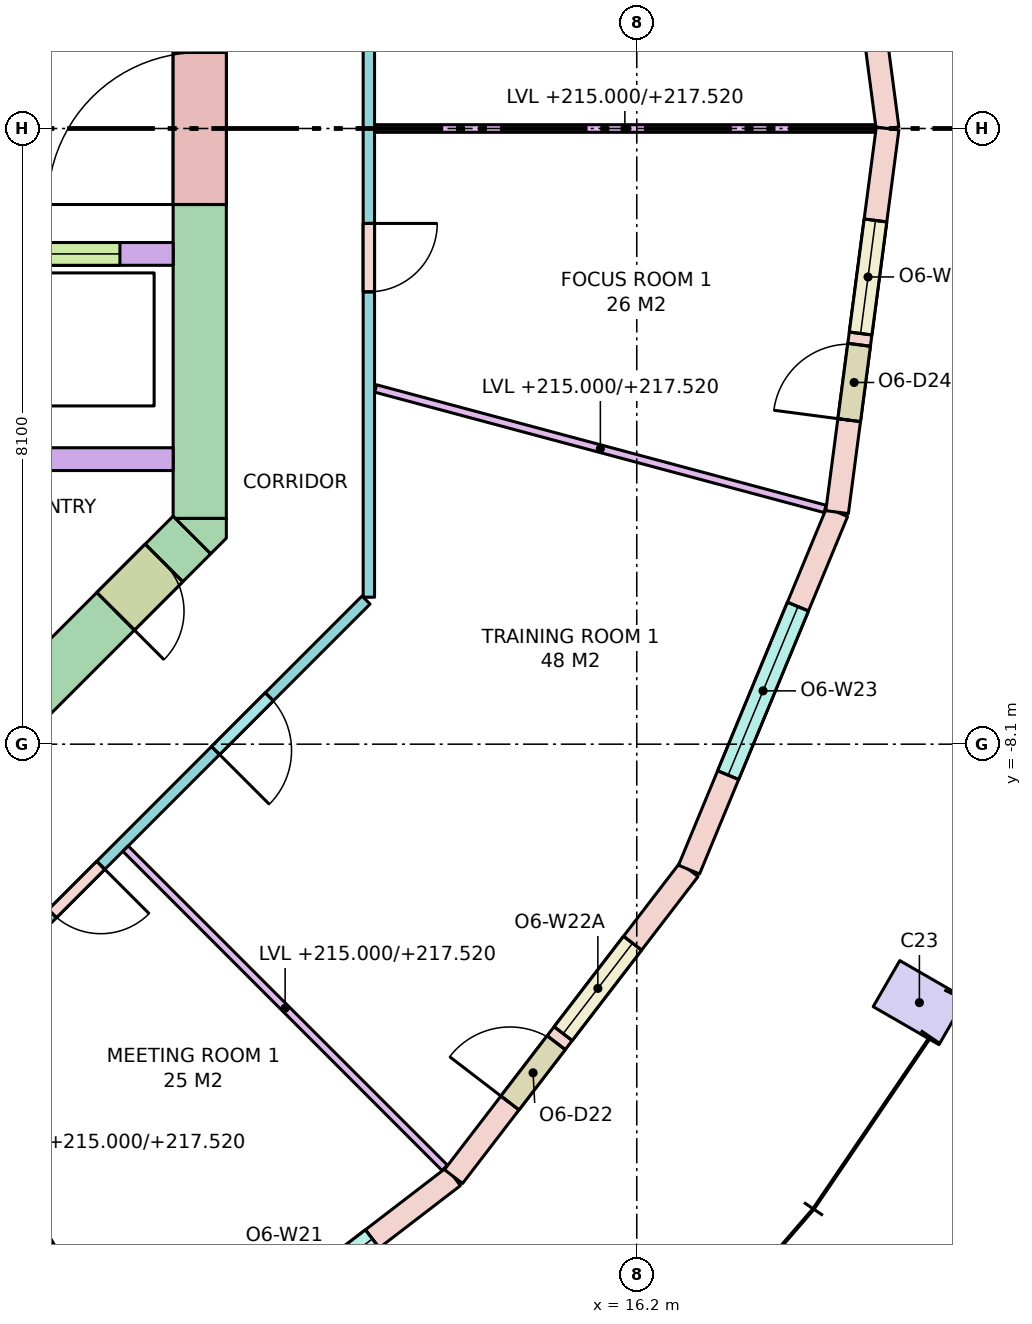
"""IFC4 building model, lengths in metres.
Left out: names, types, materials, properties, quantities, classifications, styles, units other than length and angle.
Written with IfcOpenShell. Run it as: python <this file> out.ifc"""

import sys

from ifc_helpers import new_model, si_unit, direction, frame, frame_2d, origin, origin_2d, place, context, subcontext, project, spatial, polyline, rectangle, outline, extrude, element, fill, save


model = new_model("IFC4")
c1 = context("Model", 3, precision=1e-05, world=origin(), true_north=direction((0.0, 1.0)))
c2 = subcontext(c1, "Body", "Model", "MODEL_VIEW")
j1 = project(units=[si_unit("LENGTHUNIT", "METRE"), si_unit("PLANEANGLEUNIT", "RADIAN")], contexts=[c1])
p1 = place(None, origin())
s1 = spatial("IfcSite", under=j1, at=p1, CompositionType="ELEMENT")
p2 = place(p1, origin())
s2 = spatial("IfcBuilding", under=s1, at=p2, CompositionType="ELEMENT")
p3 = place(p2, frame((0.0, 0.0, 215.0)))
s3 = spatial("IfcBuildingStorey", under=s2, at=p3, CompositionType="ELEMENT", Elevation=215.0)
p4 = place(p3, frame((19.919, -11.5, 0.0), z_axis=(0.0, 0.0, 1.0), x_axis=(0.5, 0.866025403784, 0.0)))
e1 = element("IfcColumn", 1, at=p4, inside=s3, PredefinedType="COLUMN", context=c2, shape_type="SweptSolid", body=[
    extrude(rectangle(XDim=0.7, YDim=1.0, at=origin_2d()), origin(), (0.0, 0.0, 1.0), 3.7),
])
p5 = place(p3, frame((10.45, -5.13, -0.28), z_axis=(0.0, 0.0, 1.0), x_axis=(0.0, 1.0, 0.0)))
e2 = element("IfcWall", 2, at=p5, inside=s3, PredefinedType="SHEAR", context=c2, shape_type="SweptSolid", body=[
    extrude(rectangle(XDim=10.26, YDim=0.7, at=frame_2d((5.13, 0.0))), origin(), (0.0, 0.0, 1.0), 3.7),
])
p6 = place(p5, frame((4.13, 0.0, 0.28)))
e3 = element("IfcOpeningElement", 3, at=p6, cuts=e2, PredefinedType="OPENING", context=c2, shape_type="SweptSolid", body=[
    extrude(rectangle(XDim=2.0, YDim=2.1, at=frame_2d((1.0, 1.05))), frame((0.0, 0.36, 0.0), z_axis=(0.0, -1.0, 0.0), x_axis=(1.0, 0.0, 0.0)), (0.0, 0.0, 1.0), 0.72),
])
p7 = place(p3, frame((10.347, -5.347, -0.28), z_axis=(0.0, 0.0, 1.0), x_axis=(-0.707106781187, -0.707106781187, 0.0)))
e4 = element("IfcWall", 4, at=p7, inside=s3, PredefinedType="SHEAR", context=c2, shape_type="SweptSolid", body=[
    extrude(rectangle(XDim=4.243, YDim=0.7, at=frame_2d((2.121, 0.0))), origin(), (0.0, 0.0, 1.0), 3.7),
])
p8 = place(p7, frame((0.52, 0.0, 0.28)))
e5 = element("IfcOpeningElement", 5, at=p8, cuts=e4, PredefinedType="OPENING", context=c2, shape_type="SweptSolid", body=[
    extrude(rectangle(XDim=0.9, YDim=2.1, at=frame_2d((0.45, 1.05))), frame((0.0, 0.36, 0.0), z_axis=(0.0, -1.0, 0.0), x_axis=(1.0, 0.0, 0.0)), (0.0, 0.0, 1.0), 0.72),
])
p9 = place(p3, frame((0.0, 0.0, -0.28)))
e6 = element("IfcWall", 6, at=p9, inside=s3, PredefinedType="SHEAR", context=c2, shape_type="SweptSolid", body=[
    extrude(outline(polyline([(10.8, -5.39), (10.595, -5.595), (10.595, -5.595), (10.595, -5.595), (10.13, -5.13), (10.8, -5.13), (10.8, -5.13), (10.8, -5.39)])), origin(), (0.0, 0.0, 1.0), 3.7),
])
p10 = place(p3, frame((2.0, -4.35, 0.0), z_axis=(0.0, 0.0, 1.0), x_axis=(1.0, 0.0, 0.0)))
e7 = element("IfcWall", 7, at=p10, inside=s3, PredefinedType="SOLIDWALL", context=c2, shape_type="SweptSolid", body=[
    extrude(rectangle(XDim=8.1, YDim=0.3, at=frame_2d((4.05, 0.0))), origin(), (0.0, 0.0, 1.0), 3.42),
])
p11 = place(p3, frame((2.0, -1.65, 0.0), z_axis=(0.0, 0.0, 1.0), x_axis=(1.0, 0.0, 0.0)))
e8 = element("IfcWall", 8, at=p11, inside=s3, PredefinedType="SOLIDWALL", context=c2, shape_type="SweptSolid", body=[
    extrude(rectangle(XDim=8.1, YDim=0.3, at=frame_2d((4.05, 0.0))), origin(), (0.0, 0.0, 1.0), 3.42),
])
p12 = place(p11, frame((0.85, 0.0, 0.0)))
e9 = element("IfcOpeningElement", 9, at=p12, cuts=e8, PredefinedType="OPENING", context=c2, shape_type="SweptSolid", body=[
    extrude(rectangle(XDim=1.1, YDim=2.1, at=frame_2d((0.55, 1.05))), frame((0.0, 0.16, 0.0), z_axis=(0.0, -1.0, 0.0), x_axis=(1.0, 0.0, 0.0)), (0.0, 0.0, 1.0), 0.32),
])
p13 = place(p11, frame((3.5, 0.0, 0.0)))
e10 = element("IfcOpeningElement", 10, at=p13, cuts=e8, PredefinedType="OPENING", context=c2, shape_type="SweptSolid", body=[
    extrude(rectangle(XDim=1.1, YDim=2.1, at=frame_2d((0.55, 1.05))), frame((0.0, 0.16, 0.0), z_axis=(0.0, -1.0, 0.0), x_axis=(1.0, 0.0, 0.0)), (0.0, 0.0, 1.0), 0.32),
])
p14 = place(p11, frame((6.3, 0.0, 0.0)))
e11 = element("IfcOpeningElement", 11, at=p14, cuts=e8, PredefinedType="OPENING", context=c2, shape_type="SweptSolid", body=[
    extrude(rectangle(XDim=1.1, YDim=2.1, at=frame_2d((0.55, 1.05))), frame((0.0, 0.16, 0.0), z_axis=(0.0, -1.0, 0.0), x_axis=(1.0, 0.0, 0.0)), (0.0, 0.0, 1.0), 0.32),
])
p15 = place(p3, frame((19.5, 0.0, 0.0), z_axis=(0.0, 0.0, 1.0), x_axis=(-0.130495451964, 0.99144890792, 0.0)))
e12 = element("IfcWall", 12, at=p15, inside=s3, PredefinedType="STANDARD", context=c2, shape_type="SweptSolid", body=[
    extrude(rectangle(XDim=5.091, YDim=0.3, at=frame_2d((2.545, 0.0))), origin(), (0.0, 0.0, 1.0), 3.42),
])
p16 = place(p15, frame((1.345, 0.0, 0.8)))
e13 = element("IfcOpeningElement", 13, at=p16, cuts=e12, PredefinedType="OPENING", context=c2, shape_type="SweptSolid", body=[
    extrude(rectangle(XDim=2.4, YDim=2.4, at=frame_2d((1.2, 1.2))), frame((0.0, 0.16, 0.0), z_axis=(0.0, -1.0, 0.0), x_axis=(1.0, 0.0, 0.0)), (0.0, 0.0, 1.0), 0.32),
])
p17 = place(p3, frame((9.75, -16.887, 0.0), z_axis=(0.0, 0.0, 1.0), x_axis=(0.79335619014, 0.608757714995, 0.0)))
e14 = element("IfcWall", 14, at=p17, inside=s3, PredefinedType="STANDARD", context=c2, shape_type="SweptSolid", body=[
    extrude(rectangle(XDim=5.091, YDim=0.3, at=frame_2d((2.545, 0.0))), origin(), (0.0, 0.0, 1.0), 3.42),
])
p18 = place(p17, frame((1.345, 0.0, 0.8)))
e15 = element("IfcOpeningElement", 15, at=p18, cuts=e14, PredefinedType="OPENING", context=c2, shape_type="SweptSolid", body=[
    extrude(rectangle(XDim=2.4, YDim=2.4, at=frame_2d((1.2, 1.2))), frame((0.0, 0.16, 0.0), z_axis=(0.0, -1.0, 0.0), x_axis=(1.0, 0.0, 0.0)), (0.0, 0.0, 1.0), 0.32),
])
p19 = place(p3, frame((13.789, -13.789, 0.0), z_axis=(0.0, 0.0, 1.0), x_axis=(0.608757714995, 0.79335619014, 0.0)))
e16 = element("IfcWall", 16, at=p19, inside=s3, PredefinedType="STANDARD", context=c2, shape_type="SweptSolid", body=[
    extrude(rectangle(XDim=5.091, YDim=0.3, at=frame_2d((2.545, 0.0))), origin(), (0.0, 0.0, 1.0), 3.42),
])
p20 = place(p19, frame((1.22, 0.0, 0.0)))
e17 = element("IfcOpeningElement", 17, at=p20, cuts=e16, PredefinedType="OPENING", context=c2, shape_type="SweptSolid", body=[
    extrude(rectangle(XDim=1.0, YDim=2.4, at=frame_2d((0.5, 1.2))), frame((0.0, 0.16, 0.0), z_axis=(0.0, -1.0, 0.0), x_axis=(1.0, 0.0, 0.0)), (0.0, 0.0, 1.0), 0.32),
])
p21 = place(p19, frame((2.37, 0.0, 0.8)))
e18 = element("IfcOpeningElement", 18, at=p21, cuts=e16, PredefinedType="OPENING", context=c2, shape_type="SweptSolid", body=[
    extrude(rectangle(XDim=1.5, YDim=2.4, at=frame_2d((0.75, 1.2))), frame((0.0, 0.16, 0.0), z_axis=(0.0, -1.0, 0.0), x_axis=(1.0, 0.0, 0.0)), (0.0, 0.0, 1.0), 0.32),
])
p22 = place(p3, frame((16.887, -9.75, 0.0), z_axis=(0.0, 0.0, 1.0), x_axis=(0.382724538613, 0.923862504675, 0.0)))
e19 = element("IfcWall", 19, at=p22, inside=s3, PredefinedType="STANDARD", context=c2, shape_type="SweptSolid", body=[
    extrude(rectangle(XDim=5.091, YDim=0.3, at=frame_2d((2.545, 0.0))), origin(), (0.0, 0.0, 1.0), 3.42),
])
p23 = place(p22, frame((1.345, 0.0, 0.8)))
e20 = element("IfcOpeningElement", 20, at=p23, cuts=e19, PredefinedType="OPENING", context=c2, shape_type="SweptSolid", body=[
    extrude(rectangle(XDim=2.4, YDim=2.4, at=frame_2d((1.2, 1.2))), frame((0.0, 0.16, 0.0), z_axis=(0.0, -1.0, 0.0), x_axis=(1.0, 0.0, 0.0)), (0.0, 0.0, 1.0), 0.32),
])
p24 = place(p3, frame((18.836, -5.047, 0.0), z_axis=(0.0, 0.0, 1.0), x_axis=(0.130495451964, 0.99144890792, 0.0)))
e21 = element("IfcWall", 21, at=p24, inside=s3, PredefinedType="STANDARD", context=c2, shape_type="SweptSolid", body=[
    extrude(rectangle(XDim=5.091, YDim=0.3, at=frame_2d((2.545, 0.0))), origin(), (0.0, 0.0, 1.0), 3.42),
])
p25 = place(p24, frame((1.22, 0.0, 0.0)))
e22 = element("IfcOpeningElement", 22, at=p25, cuts=e21, PredefinedType="OPENING", context=c2, shape_type="SweptSolid", body=[
    extrude(rectangle(XDim=1.0, YDim=2.4, at=frame_2d((0.5, 1.2))), frame((0.0, 0.16, 0.0), z_axis=(0.0, -1.0, 0.0), x_axis=(1.0, 0.0, 0.0)), (0.0, 0.0, 1.0), 0.32),
])
p26 = place(p24, frame((2.37, 0.0, 0.8)))
e23 = element("IfcOpeningElement", 23, at=p26, cuts=e21, PredefinedType="OPENING", context=c2, shape_type="SweptSolid", body=[
    extrude(rectangle(XDim=1.5, YDim=2.4, at=frame_2d((0.75, 1.2))), frame((0.0, 0.16, 0.0), z_axis=(0.0, -1.0, 0.0), x_axis=(1.0, 0.0, 0.0)), (0.0, 0.0, 1.0), 0.32),
])
p27 = place(p3, frame((12.638, -6.204, 0.0), z_axis=(0.0, 0.0, 1.0), x_axis=(-0.707106781187, -0.707106781187, 0.0)))
e24 = element("IfcWall", 24, at=p27, inside=s3, PredefinedType="PARTITIONING", context=c2, shape_type="SweptSolid", body=[
    extrude(rectangle(XDim=6.271, YDim=0.15, at=frame_2d((3.135, 0.0))), origin(), (0.0, 0.0, 1.0), 2.52),
])
p28 = place(p27, frame((4.935, 0.0, 0.0)))
e25 = element("IfcOpeningElement", 25, at=p28, cuts=e24, PredefinedType="OPENING", context=c2, shape_type="SweptSolid", body=[
    extrude(rectangle(XDim=0.9, YDim=2.1, at=frame_2d((0.45, 1.05))), frame((0.0, 0.085, 0.0), z_axis=(0.0, -1.0, 0.0), x_axis=(1.0, 0.0, 0.0)), (0.0, 0.0, 1.0), 0.17),
])
p29 = place(p27, frame((1.8, 0.0, 0.0)))
e26 = element("IfcOpeningElement", 26, at=p29, cuts=e24, PredefinedType="OPENING", context=c2, shape_type="SweptSolid", body=[
    extrude(rectangle(XDim=1.0, YDim=2.1, at=frame_2d((0.5, 1.05))), frame((0.0, 0.085, 0.0), z_axis=(0.0, -1.0, 0.0), x_axis=(1.0, 0.0, 0.0)), (0.0, 0.0, 1.0), 0.17),
])
p30 = place(p3, frame((12.675, 6.167, 0.0), z_axis=(0.0, 0.0, 1.0), x_axis=(0.0, -1.0, 0.0)))
e27 = element("IfcWall", 27, at=p30, inside=s3, PredefinedType="PARTITIONING", context=c2, shape_type="SweptSolid", body=[
    extrude(rectangle(XDim=12.333, YDim=0.15, at=frame_2d((6.167, 0.0))), origin(), (0.0, 0.0, 1.0), 2.52),
])
p31 = place(p30, frame((7.416, 0.0, 0.0)))
e28 = element("IfcOpeningElement", 28, at=p31, cuts=e27, PredefinedType="OPENING", context=c2, shape_type="SweptSolid", body=[
    extrude(rectangle(XDim=0.9, YDim=2.1, at=frame_2d((0.45, 1.05))), frame((0.0, 0.085, 0.0), z_axis=(0.0, -1.0, 0.0), x_axis=(1.0, 0.0, 0.0)), (0.0, 0.0, 1.0), 0.17),
])
p32 = place(p3, frame((12.75, 0.0, 0.0), z_axis=(0.0, 0.0, 1.0), x_axis=(1.0, 0.0, 0.0)))
e29 = element("IfcWall", 29, at=p32, inside=s3, PredefinedType="PARTITIONING", context=c2, shape_type="SweptSolid", body=[
    extrude(rectangle(XDim=6.587, YDim=0.1, at=frame_2d((3.293, 0.0))), origin(), (0.0, 0.0, 1.0), 2.52),
])
p33 = place(p3, frame((6.221, -10.775, 0.0), z_axis=(0.0, 0.0, 1.0), x_axis=(0.500015661236, -0.866016361577, 0.0)))
e30 = element("IfcWall", 30, at=p33, inside=s3, PredefinedType="PARTITIONING", context=c2, shape_type="SweptSolid", body=[
    extrude(rectangle(XDim=6.895, YDim=0.1, at=frame_2d((3.448, 0.0))), origin(), (0.0, 0.0, 1.0), 2.52),
])
p34 = place(p3, frame((9.474, -9.474, 0.0), z_axis=(0.0, 0.0, 1.0), x_axis=(0.707106781187, -0.707106781187, 0.0)))
e31 = element("IfcWall", 31, at=p34, inside=s3, PredefinedType="PARTITIONING", context=c2, shape_type="SweptSolid", body=[
    extrude(rectangle(XDim=5.938, YDim=0.1, at=frame_2d((2.969, 0.0))), origin(), (0.0, 0.0, 1.0), 2.52),
])
p35 = place(p3, frame((12.764, -3.42, 0.0), z_axis=(0.0, 0.0, 1.0), x_axis=(0.965925800266, -0.258819142221, 0.0)))
e32 = element("IfcWall", 32, at=p35, inside=s3, PredefinedType="PARTITIONING", context=c2, shape_type="SweptSolid", body=[
    extrude(rectangle(XDim=6.122, YDim=0.1, at=frame_2d((3.061, 0.0))), origin(), (0.0, 0.0, 1.0), 2.52),
])
p36 = place(p18, origin())
e33 = element("IfcWindow", 33, at=p36, inside=s3, PartitioningType="SINGLE_PANEL", PredefinedType="WINDOW", context=c2, shape_type="SweptSolid", body=[
    extrude(rectangle(XDim=2.4, YDim=2.4, at=frame_2d((1.2, 1.2))), frame((0.0, 0.03, 0.0), z_axis=(0.0, -1.0, 0.0), x_axis=(1.0, 0.0, 0.0)), (0.0, 0.0, 1.0), 0.06),
])
fill(e15, e33)
p37 = place(p20, origin())
e34 = element("IfcDoor", 34, at=p37, inside=s3, OperationType="SINGLE_SWING_LEFT", PredefinedType="DOOR", context=c2, shape_type="SweptSolid", body=[
    extrude(rectangle(XDim=1.0, YDim=2.4, at=frame_2d((0.5, 1.2))), frame((0.0, 0.025, 0.0), z_axis=(0.0, -1.0, 0.0), x_axis=(1.0, 0.0, 0.0)), (0.0, 0.0, 1.0), 0.05),
])
fill(e17, e34)
p38 = place(p21, origin())
e35 = element("IfcWindow", 35, at=p38, inside=s3, PartitioningType="SINGLE_PANEL", PredefinedType="WINDOW", context=c2, shape_type="SweptSolid", body=[
    extrude(rectangle(XDim=1.5, YDim=2.4, at=frame_2d((0.75, 1.2))), frame((0.0, 0.03, 0.0), z_axis=(0.0, -1.0, 0.0), x_axis=(1.0, 0.0, 0.0)), (0.0, 0.0, 1.0), 0.06),
])
fill(e18, e35)
p39 = place(p23, origin())
e36 = element("IfcWindow", 36, at=p39, inside=s3, PartitioningType="SINGLE_PANEL", PredefinedType="WINDOW", context=c2, shape_type="SweptSolid", body=[
    extrude(rectangle(XDim=2.4, YDim=2.4, at=frame_2d((1.2, 1.2))), frame((0.0, 0.03, 0.0), z_axis=(0.0, -1.0, 0.0), x_axis=(1.0, 0.0, 0.0)), (0.0, 0.0, 1.0), 0.06),
])
fill(e20, e36)
p40 = place(p25, origin())
e37 = element("IfcDoor", 37, at=p40, inside=s3, OperationType="SINGLE_SWING_LEFT", PredefinedType="DOOR", context=c2, shape_type="SweptSolid", body=[
    extrude(rectangle(XDim=1.0, YDim=2.4, at=frame_2d((0.5, 1.2))), frame((0.0, 0.025, 0.0), z_axis=(0.0, -1.0, 0.0), x_axis=(1.0, 0.0, 0.0)), (0.0, 0.0, 1.0), 0.05),
])
fill(e22, e37)
p41 = place(p26, origin())
e38 = element("IfcWindow", 38, at=p41, inside=s3, PartitioningType="SINGLE_PANEL", PredefinedType="WINDOW", context=c2, shape_type="SweptSolid", body=[
    extrude(rectangle(XDim=1.5, YDim=2.4, at=frame_2d((0.75, 1.2))), frame((0.0, 0.03, 0.0), z_axis=(0.0, -1.0, 0.0), x_axis=(1.0, 0.0, 0.0)), (0.0, 0.0, 1.0), 0.06),
])
fill(e23, e38)
p42 = place(p14, origin())
e39 = element("IfcDoor", 39, at=p42, inside=s3, OperationType="DOUBLE_DOOR_SLIDING", PredefinedType="DOOR", context=c2, shape_type="SweptSolid", body=[
    extrude(rectangle(XDim=1.1, YDim=2.1, at=frame_2d((0.55, 1.05))), frame((0.0, 0.025, 0.0), z_axis=(0.0, -1.0, 0.0), x_axis=(1.0, 0.0, 0.0)), (0.0, 0.0, 1.0), 0.05),
])
fill(e11, e39)
p43 = place(p6, origin())
e40 = element("IfcDoor", 40, at=p43, inside=s3, OperationType="DOUBLE_DOOR_SINGLE_SWING", PredefinedType="DOOR", context=c2, shape_type="SweptSolid", body=[
    extrude(rectangle(XDim=2.0, YDim=2.1, at=frame_2d((1.0, 1.05))), frame((0.0, 0.025, 0.0), z_axis=(0.0, -1.0, 0.0), x_axis=(1.0, 0.0, 0.0)), (0.0, 0.0, 1.0), 0.05),
])
fill(e3, e40)
p44 = place(p8, origin())
e41 = element("IfcDoor", 41, at=p44, inside=s3, OperationType="SINGLE_SWING_RIGHT", PredefinedType="DOOR", context=c2, shape_type="SweptSolid", body=[
    extrude(rectangle(XDim=0.9, YDim=2.1, at=frame_2d((0.45, 1.05))), frame((0.0, 0.025, 0.0), z_axis=(0.0, -1.0, 0.0), x_axis=(1.0, 0.0, 0.0)), (0.0, 0.0, 1.0), 0.05),
])
fill(e5, e41)
p45 = place(p28, origin())
e42 = element("IfcDoor", 42, at=p45, inside=s3, OperationType="SINGLE_SWING_LEFT", PredefinedType="DOOR", context=c2, shape_type="SweptSolid", body=[
    extrude(rectangle(XDim=0.9, YDim=2.1, at=frame_2d((0.45, 1.05))), frame((0.0, 0.025, 0.0), z_axis=(0.0, -1.0, 0.0), x_axis=(1.0, 0.0, 0.0)), (0.0, 0.0, 1.0), 0.05),
])
fill(e25, e42)
p46 = place(p29, origin())
e43 = element("IfcDoor", 43, at=p46, inside=s3, OperationType="SINGLE_SWING_RIGHT", PredefinedType="DOOR", context=c2, shape_type="SweptSolid", body=[
    extrude(rectangle(XDim=1.0, YDim=2.1, at=frame_2d((0.5, 1.05))), frame((0.0, 0.025, 0.0), z_axis=(0.0, -1.0, 0.0), x_axis=(1.0, 0.0, 0.0)), (0.0, 0.0, 1.0), 0.05),
])
fill(e26, e43)
p47 = place(p31, origin())
e44 = element("IfcDoor", 44, at=p47, inside=s3, OperationType="SINGLE_SWING_LEFT", PredefinedType="DOOR", context=c2, shape_type="SweptSolid", body=[
    extrude(rectangle(XDim=0.9, YDim=2.1, at=frame_2d((0.45, 1.05))), frame((0.0, 0.025, 0.0), z_axis=(0.0, -1.0, 0.0), x_axis=(1.0, 0.0, 0.0)), (0.0, 0.0, 1.0), 0.05),
])
fill(e28, e44)
save(model, sys.argv[1])
